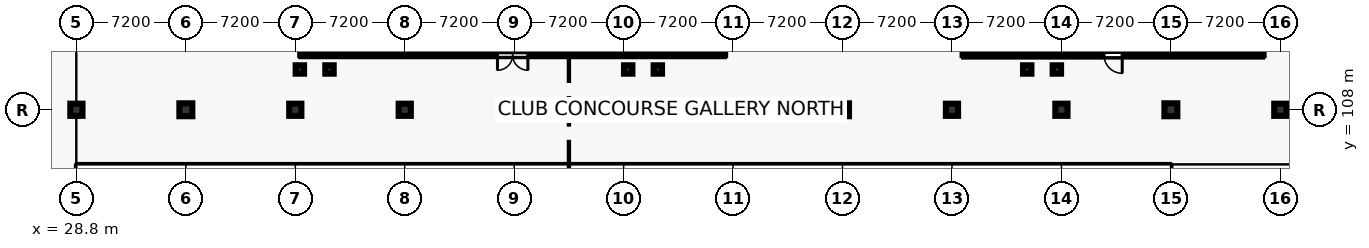
"""IFC4 building model, lengths in metres.
Left out: names, types, materials, properties, quantities, classifications, styles, units other than length and angle.
Written with IfcOpenShell. Run it as: python <this file> out.ifc"""

import sys

from ifc_helpers import new_model, si_unit, direction, frame, frame_2d, origin, origin_2d, place, context, subcontext, project, spatial, rectangle, circle, extrude, element, fill, save


model = new_model("IFC4")
c1 = context("Model", 3, precision=1e-05, world=origin(), true_north=direction((0.0, 1.0)))
c2 = subcontext(c1, "Body", "Model", "MODEL_VIEW")
j1 = project(units=[si_unit("LENGTHUNIT", "METRE"), si_unit("PLANEANGLEUNIT", "RADIAN")], contexts=[c1])
p1 = place(None, origin())
s1 = spatial("IfcSite", under=j1, at=p1, CompositionType="ELEMENT")
p2 = place(p1, origin())
s2 = spatial("IfcBuilding", under=s1, at=p2, CompositionType="ELEMENT")
p3 = place(p2, frame((0.0, 0.0, 5.4)))
s3 = spatial("IfcBuildingStorey", under=s2, at=p3, CompositionType="ELEMENT", Elevation=5.4)
p4 = place(p3, frame((28.8, 108.0, 0.0), z_axis=(0.0, 0.0, 1.0), x_axis=(1.0, 0.0, 0.0)))
e1 = element("IfcColumn", 1, at=p4, inside=s3, PredefinedType="COLUMN", context=c2, shape_type="SweptSolid", body=[
    extrude(rectangle(XDim=0.8, YDim=0.8, at=origin_2d()), origin(), (0.0, 0.0, 1.0), 4.2),
])
p5 = place(p3, frame((36.0, 108.0, 0.0), z_axis=(0.0, 0.0, 1.0), x_axis=(1.0, 0.0, 0.0)))
e2 = element("IfcColumn", 2, at=p5, inside=s3, PredefinedType="COLUMN", context=c2, shape_type="SweptSolid", body=[
    extrude(rectangle(XDim=0.85, YDim=0.85, at=origin_2d()), origin(), (0.0, 0.0, 1.0), 4.2),
])
p6 = place(p3, frame((43.2, 108.0, 0.0), z_axis=(0.0, 0.0, 1.0), x_axis=(1.0, 0.0, 0.0)))
e3 = element("IfcColumn", 3, at=p6, inside=s3, PredefinedType="COLUMN", context=c2, shape_type="SweptSolid", body=[
    extrude(circle(Radius=0.4, at=origin_2d()), origin(), (0.0, 0.0, 1.0), 4.2),
])
p7 = place(p3, frame((50.4, 108.0, 0.0), z_axis=(0.0, 0.0, 1.0), x_axis=(1.0, 0.0, 0.0)))
e4 = element("IfcColumn", 4, at=p7, inside=s3, PredefinedType="COLUMN", context=c2, shape_type="SweptSolid", body=[
    extrude(rectangle(XDim=0.8, YDim=0.8, at=origin_2d()), origin(), (0.0, 0.0, 1.0), 4.2),
])
p8 = place(p3, frame((57.6, 108.0, 0.0), z_axis=(0.0, 0.0, 1.0), x_axis=(1.0, 0.0, 0.0)))
e5 = element("IfcColumn", 5, at=p8, inside=s3, PredefinedType="COLUMN", context=c2, shape_type="SweptSolid", body=[
    extrude(rectangle(XDim=0.85, YDim=0.85, at=origin_2d()), origin(), (0.0, 0.0, 1.0), 4.2),
])
p9 = place(p3, frame((64.8, 108.0, 0.0), z_axis=(0.0, 0.0, 1.0), x_axis=(1.0, 0.0, 0.0)))
e6 = element("IfcColumn", 6, at=p9, inside=s3, PredefinedType="COLUMN", context=c2, shape_type="SweptSolid", body=[
    extrude(circle(Radius=0.4, at=origin_2d()), origin(), (0.0, 0.0, 1.0), 4.2),
])
p10 = place(p3, frame((72.0, 108.0, 0.0), z_axis=(0.0, 0.0, 1.0), x_axis=(1.0, 0.0, 0.0)))
e7 = element("IfcColumn", 7, at=p10, inside=s3, PredefinedType="COLUMN", context=c2, shape_type="SweptSolid", body=[
    extrude(rectangle(XDim=0.8, YDim=0.8, at=origin_2d()), origin(), (0.0, 0.0, 1.0), 4.2),
])
p11 = place(p3, frame((79.2, 108.0, 0.0), z_axis=(0.0, 0.0, 1.0), x_axis=(1.0, 0.0, 0.0)))
e8 = element("IfcColumn", 8, at=p11, inside=s3, PredefinedType="COLUMN", context=c2, shape_type="SweptSolid", body=[
    extrude(rectangle(XDim=0.85, YDim=0.85, at=origin_2d()), origin(), (0.0, 0.0, 1.0), 4.2),
])
p12 = place(p3, frame((86.4, 108.0, 0.0), z_axis=(0.0, 0.0, 1.0), x_axis=(1.0, 0.0, 0.0)))
e9 = element("IfcColumn", 9, at=p12, inside=s3, PredefinedType="COLUMN", context=c2, shape_type="SweptSolid", body=[
    extrude(circle(Radius=0.4, at=origin_2d()), origin(), (0.0, 0.0, 1.0), 4.2),
])
p13 = place(p3, frame((93.6, 108.0, 0.0), z_axis=(0.0, 0.0, 1.0), x_axis=(1.0, 0.0, 0.0)))
e10 = element("IfcColumn", 10, at=p13, inside=s3, PredefinedType="COLUMN", context=c2, shape_type="SweptSolid", body=[
    extrude(rectangle(XDim=0.8, YDim=0.8, at=origin_2d()), origin(), (0.0, 0.0, 1.0), 4.2),
])
p14 = place(p3, frame((100.8, 108.0, 0.0), z_axis=(0.0, 0.0, 1.0), x_axis=(1.0, 0.0, 0.0)))
e11 = element("IfcColumn", 11, at=p14, inside=s3, PredefinedType="COLUMN", context=c2, shape_type="SweptSolid", body=[
    extrude(rectangle(XDim=0.85, YDim=0.85, at=origin_2d()), origin(), (0.0, 0.0, 1.0), 4.2),
])
p15 = place(p3, frame((108.0, 108.0, 0.0), z_axis=(0.0, 0.0, 1.0), x_axis=(1.0, 0.0, 0.0)))
e12 = element("IfcColumn", 12, at=p15, inside=s3, PredefinedType="COLUMN", context=c2, shape_type="SweptSolid", body=[
    extrude(rectangle(XDim=0.8, YDim=0.8, at=origin_2d()), origin(), (0.0, 0.0, 1.0), 4.2),
])
for number, where, z_axis, x_axis in (
    (13, (43.5, 110.65, 0.0), (0.0, 0.0, 1.0), (1.0, 0.0, 0.0)),
    (14, (45.45, 110.65, 0.0), (0.0, 0.0, 1.0), (1.0, 0.0, 0.0)),
    (15, (65.1, 110.65, 0.0), (0.0, 0.0, 1.0), (1.0, 0.0, 0.0)),
    (16, (67.05, 110.65, 0.0), (0.0, 0.0, 1.0), (1.0, 0.0, 0.0)),
    (17, (91.35, 110.65, 0.0), (0.0, 0.0, 1.0), (1.0, 0.0, 0.0)),
    (18, (93.3, 110.65, 0.0), (0.0, 0.0, 1.0), (1.0, 0.0, 0.0)),
):
    element("IfcColumn", number, at=place(p3, frame(where, z_axis=z_axis, x_axis=x_axis)), inside=s3, PredefinedType="COLUMN", context=c2, shape_type="SweptSolid", body=[
        extrude(rectangle(XDim=0.55, YDim=0.55, at=origin_2d()), origin(), (0.0, 0.0, 1.0), 4.2),
    ])
p16 = place(p3, frame((43.6, 111.6, 0.0), z_axis=(0.0, 0.0, 1.0), x_axis=(1.0, 0.0, 0.0)))
e19 = element("IfcWall", 19, at=p16, inside=s3, PredefinedType="PARTITIONING", context=c2, shape_type="SweptSolid", body=[
    extrude(rectangle(XDim=27.8, YDim=0.15, at=frame_2d((13.9, 0.0))), origin(), (0.0, 0.0, 1.0), 2.98),
])
p17 = place(p16, frame((12.9, 0.0, 0.0)))
e20 = element("IfcOpeningElement", 20, at=p17, cuts=e19, PredefinedType="OPENING", context=c2, shape_type="SweptSolid", body=[
    extrude(rectangle(XDim=2.0, YDim=2.4, at=frame_2d((1.0, 1.2))), frame((0.0, 0.085, 0.0), z_axis=(0.0, -1.0, 0.0), x_axis=(1.0, 0.0, 0.0)), (0.0, 0.0, 1.0), 0.17),
])
for number, where, z_axis, x_axis in (
    (21, (71.4, 111.6, 0.0), (0.0, 0.0, 1.0), (0.0, 1.0, 0.0)),
    (22, (43.6, 121.6, 0.0), (0.0, 0.0, 1.0), (0.0, -1.0, 0.0)),
):
    element("IfcWall", number, at=place(p3, frame(where, z_axis=z_axis, x_axis=x_axis)), inside=s3, PredefinedType="PARTITIONING", context=c2, shape_type="SweptSolid", body=[
        extrude(rectangle(XDim=10.0, YDim=0.15, at=frame_2d((5.0, 0.0))), origin(), (0.0, 0.0, 1.0), 2.98),
    ])
p18 = place(p3, frame((87.2, 111.6, 0.0), z_axis=(0.0, 0.0, 1.0), x_axis=(1.0, 0.0, 0.0)))
e23 = element("IfcWall", 23, at=p18, inside=s3, PredefinedType="PARTITIONING", context=c2, shape_type="SweptSolid", body=[
    extrude(rectangle(XDim=19.6, YDim=0.2, at=frame_2d((9.8, 0.0))), origin(), (0.0, 0.0, 1.0), 2.98),
])
p19 = place(p18, frame((9.2, 0.0, 0.0)))
e24 = element("IfcOpeningElement", 24, at=p19, cuts=e23, PredefinedType="OPENING", context=c2, shape_type="SweptSolid", body=[
    extrude(rectangle(XDim=1.2, YDim=2.25, at=frame_2d((0.6, 1.125))), frame((0.0, 0.11, 0.0), z_axis=(0.0, -1.0, 0.0), x_axis=(1.0, 0.0, 0.0)), (0.0, 0.0, 1.0), 0.22),
])
for number, where, z_axis, x_axis in (
    (25, (106.8, 111.6, 0.0), (0.0, 0.0, 1.0), (0.0, 1.0, 0.0)),
    (26, (87.2, 121.6, 0.0), (0.0, 0.0, 1.0), (0.0, -1.0, 0.0)),
):
    element("IfcWall", number, at=place(p3, frame(where, z_axis=z_axis, x_axis=x_axis)), inside=s3, PredefinedType="PARTITIONING", context=c2, shape_type="SweptSolid", body=[
        extrude(rectangle(XDim=10.0, YDim=0.2, at=frame_2d((5.0, 0.0))), origin(), (0.0, 0.0, 1.0), 2.98),
    ])
p20 = place(p17, frame((2.0, 0.0, 0.0), z_axis=(0.0, 0.0, 1.0), x_axis=(-1.0, 0.0, 0.0)))
e27 = element("IfcDoor", 27, at=p20, inside=s3, OperationType="DOUBLE_DOOR_SINGLE_SWING", PredefinedType="DOOR", context=c2, shape_type="SweptSolid", body=[
    extrude(rectangle(XDim=2.0, YDim=2.4, at=frame_2d((1.0, 1.2))), frame((0.0, 0.025, 0.0), z_axis=(0.0, -1.0, 0.0), x_axis=(1.0, 0.0, 0.0)), (0.0, 0.0, 1.0), 0.05),
])
fill(e20, e27)
p21 = place(p19, frame((1.2, 0.0, 0.0), z_axis=(0.0, 0.0, 1.0), x_axis=(-1.0, 0.0, 0.0)))
e28 = element("IfcDoor", 28, at=p21, inside=s3, OperationType="SINGLE_SWING_RIGHT", PredefinedType="DOOR", context=c2, shape_type="SweptSolid", body=[
    extrude(rectangle(XDim=1.2, YDim=2.25, at=frame_2d((0.6, 1.125))), frame((0.0, 0.025, 0.0), z_axis=(0.0, -1.0, 0.0), x_axis=(1.0, 0.0, 0.0)), (0.0, 0.0, 1.0), 0.05),
])
fill(e24, e28)
save(model, sys.argv[1])
